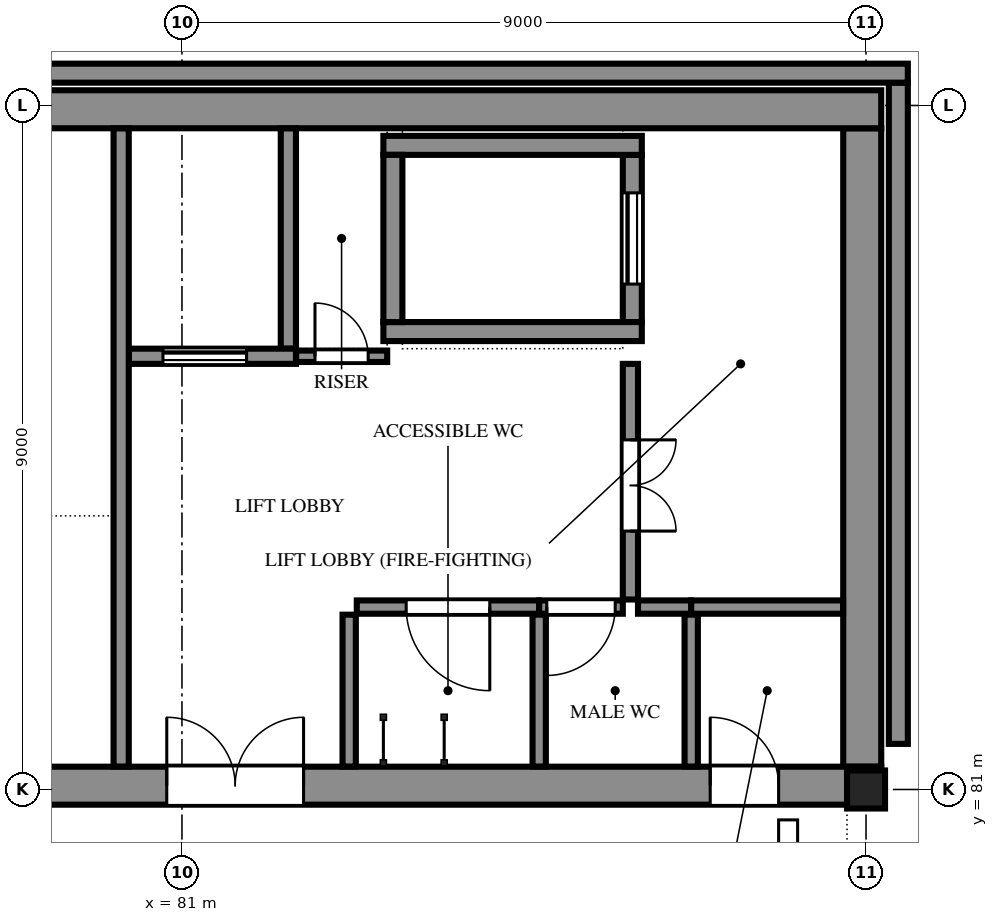
"""IFC4 building model, lengths in metres.
Left out: names, types, materials, properties, quantities, classifications, styles, units other than length and angle.
Written with IfcOpenShell. Run it as: python <this file> out.ifc"""

import sys

from ifc_helpers import new_model, si_unit, direction, frame, frame_2d, origin, origin_2d, place, context, subcontext, project, spatial, polyline, rectangle, hollow_rectangle, outline, extrude, element, fill, save


model = new_model("IFC4")
c1 = context("Model", 3, precision=1e-05, world=origin(), true_north=direction((0.0, 1.0)))
c2 = subcontext(c1, "Body", "Model", "MODEL_VIEW")
j1 = project(units=[si_unit("LENGTHUNIT", "METRE"), si_unit("PLANEANGLEUNIT", "RADIAN")], contexts=[c1])
p1 = place(None, origin())
s1 = spatial("IfcSite", under=j1, at=p1, CompositionType="ELEMENT")
p2 = place(p1, origin())
s2 = spatial("IfcBuilding", under=s1, at=p2, CompositionType="ELEMENT")
p3 = place(p2, frame((0.0, 0.0, 20.1)))
s3 = spatial("IfcBuildingStorey", under=s2, at=p3, CompositionType="ELEMENT", Elevation=20.1)
p4 = place(p3, frame((90.0, 81.0, 0.0), z_axis=(0.0, 0.0, 1.0), x_axis=(1.0, 0.0, 0.0)))
e1 = element("IfcColumn", 1, at=p4, inside=s3, PredefinedType="COLUMN", context=c2, shape_type="SweptSolid", body=[
    extrude(hollow_rectangle(XDim=0.5, YDim=0.5, WallThickness=0.032, at=origin_2d()), origin(), (0.0, 0.0, 1.0), 4.2),
])
p5 = place(p3, frame((71.8, 81.05, 0.0), z_axis=(0.0, 0.0, 1.0), x_axis=(1.0, 0.0, 0.0)))
e2 = element("IfcWall", 2, at=p5, inside=s3, PredefinedType="SOLIDWALL", context=c2, shape_type="SweptSolid", body=[
    extrude(rectangle(XDim=18.4, YDim=0.5, at=frame_2d((9.2, 0.0))), origin(), (0.0, 0.0, 1.0), 4.2),
])
p6 = place(p5, frame((1.5, 0.0, 0.0)))
e3 = element("IfcOpeningElement", 3, at=p6, cuts=e2, PredefinedType="OPENING", context=c2, shape_type="SweptSolid", body=[
    extrude(rectangle(XDim=1.8, YDim=2.1, at=frame_2d((0.9, 1.05))), frame((0.0, 0.26, 0.0), z_axis=(0.0, -1.0, 0.0), x_axis=(1.0, 0.0, 0.0)), (0.0, 0.0, 1.0), 0.52),
])
p7 = place(p5, frame((5.5, 0.0, 0.0)))
e4 = element("IfcOpeningElement", 4, at=p7, cuts=e2, PredefinedType="OPENING", context=c2, shape_type="SweptSolid", body=[
    extrude(rectangle(XDim=1.8, YDim=2.1, at=frame_2d((0.9, 1.05))), frame((0.0, 0.26, 0.0), z_axis=(0.0, -1.0, 0.0), x_axis=(1.0, 0.0, 0.0)), (0.0, 0.0, 1.0), 0.52),
])
p8 = place(p5, frame((9.0, 0.0, 0.0)))
e5 = element("IfcOpeningElement", 5, at=p8, cuts=e2, PredefinedType="OPENING", context=c2, shape_type="SweptSolid", body=[
    extrude(rectangle(XDim=1.8, YDim=2.1, at=frame_2d((0.9, 1.05))), frame((0.0, 0.26, 0.0), z_axis=(0.0, -1.0, 0.0), x_axis=(1.0, 0.0, 0.0)), (0.0, 0.0, 1.0), 0.52),
])
p9 = place(p5, frame((16.15, 0.0, 0.0)))
e6 = element("IfcOpeningElement", 6, at=p9, cuts=e2, PredefinedType="OPENING", context=c2, shape_type="SweptSolid", body=[
    extrude(rectangle(XDim=0.9, YDim=2.1, at=frame_2d((0.45, 1.05))), frame((0.0, 0.26, 0.0), z_axis=(0.0, -1.0, 0.0), x_axis=(1.0, 0.0, 0.0)), (0.0, 0.0, 1.0), 0.52),
])
p10 = place(p3, frame((71.8, 89.95, 0.0), z_axis=(0.0, 0.0, 1.0), x_axis=(1.0, 0.0, 0.0)))
e7 = element("IfcWall", 7, at=p10, inside=s3, PredefinedType="SOLIDWALL", context=c2, shape_type="SweptSolid", body=[
    extrude(rectangle(XDim=18.4, YDim=0.5, at=frame_2d((9.2, 0.0))), origin(), (0.0, 0.0, 1.0), 4.2),
])
p11 = place(p3, frame((89.95, 81.3, 0.0), z_axis=(0.0, 0.0, 1.0), x_axis=(0.0, 1.0, 0.0)))
e8 = element("IfcWall", 8, at=p11, inside=s3, PredefinedType="SOLIDWALL", context=c2, shape_type="SweptSolid", body=[
    extrude(rectangle(XDim=8.4, YDim=0.5, at=frame_2d((4.2, 0.0))), origin(), (0.0, 0.0, 1.0), 4.2),
])
p12 = place(p3, frame((80.2, 81.302, -0.15), z_axis=(0.0, 0.0, 1.0), x_axis=(0.0, 1.0, 0.0)))
e9 = element("IfcWall", 9, at=p12, inside=s3, PredefinedType="SOLIDWALL", context=c2, shape_type="SweptSolid", body=[
    extrude(rectangle(XDim=8.396, YDim=0.2, at=frame_2d((4.198, 0.0))), origin(), (0.0, 0.0, 1.0), 3.666),
])
p13 = place(p3, frame((80.302, 86.7, 0.0), z_axis=(0.0, 0.0, 1.0), x_axis=(1.0, 0.0, 0.0)))
e10 = element("IfcWall", 10, at=p13, inside=s3, PredefinedType="SOLIDWALL", context=c2, shape_type="SweptSolid", body=[
    extrude(rectangle(XDim=2.198, YDim=0.2, at=frame_2d((1.099, 0.0))), origin(), (0.0, 0.0, 1.0), 3.516),
])
p14 = place(p13, frame((0.448, 0.0, 0.0)))
e11 = element("IfcOpeningElement", 11, at=p14, cuts=e10, PredefinedType="OPENING", context=c2, shape_type="SweptSolid", body=[
    extrude(rectangle(XDim=1.1, YDim=2.1, at=frame_2d((0.55, 1.05))), frame((0.0, 0.11, 0.0), z_axis=(0.0, -1.0, 0.0), x_axis=(1.0, 0.0, 0.0)), (0.0, 0.0, 1.0), 0.22),
])
p15 = place(p3, frame((82.4, 86.8, 0.0), z_axis=(0.0, 0.0, 1.0), x_axis=(0.0, 1.0, 0.0)))
e12 = element("IfcWall", 12, at=p15, inside=s3, PredefinedType="SOLIDWALL", context=c2, shape_type="SweptSolid", body=[
    extrude(rectangle(XDim=2.898, YDim=0.2, at=frame_2d((1.449, 0.0))), origin(), (0.0, 0.0, 1.0), 3.516),
])
for number, where, z_axis, x_axis in (
    (13, (83.65, 87.025, 0.0), (0.0, 0.0, 1.0), (1.0, 0.0, 0.0)),
    (14, (83.65, 89.475, 0.0), (0.0, 0.0, 1.0), (1.0, 0.0, 0.0)),
):
    element("IfcWall", number, at=place(p3, frame(where, z_axis=z_axis, x_axis=x_axis)), inside=s3, PredefinedType="SOLIDWALL", context=c2, shape_type="SweptSolid", body=[
        extrude(rectangle(XDim=3.4, YDim=0.25, at=frame_2d((1.7, 0.0))), origin(), (0.0, 0.0, 1.0), 3.516),
    ])
p16 = place(p3, frame((83.775, 87.15, 0.0), z_axis=(0.0, 0.0, 1.0), x_axis=(0.0, 1.0, 0.0)))
e15 = element("IfcWall", 15, at=p16, inside=s3, PredefinedType="SOLIDWALL", context=c2, shape_type="SweptSolid", body=[
    extrude(rectangle(XDim=2.2, YDim=0.25, at=frame_2d((1.1, 0.0))), origin(), (0.0, 0.0, 1.0), 3.516),
])
p17 = place(p3, frame((86.925, 87.15, 0.0), z_axis=(0.0, 0.0, 1.0), x_axis=(0.0, 1.0, 0.0)))
e16 = element("IfcWall", 16, at=p17, inside=s3, PredefinedType="SOLIDWALL", context=c2, shape_type="SweptSolid", body=[
    extrude(rectangle(XDim=2.2, YDim=0.25, at=frame_2d((1.1, 0.0))), origin(), (0.0, 0.0, 1.0), 3.516),
])
p18 = place(p17, frame((0.5, 0.0, 0.0)))
e17 = element("IfcOpeningElement", 17, at=p18, cuts=e16, PredefinedType="OPENING", context=c2, shape_type="SweptSolid", body=[
    extrude(rectangle(XDim=1.2, YDim=2.1, at=frame_2d((0.6, 1.05))), frame((0.0, 0.135, 0.0), z_axis=(0.0, -1.0, 0.0), x_axis=(1.0, 0.0, 0.0)), (0.0, 0.0, 1.0), 0.27),
])
p19 = place(p3, frame((85.7, 83.4, 0.0), z_axis=(0.0, 0.0, 1.0), x_axis=(-1.0, 0.0, 0.0)))
e18 = element("IfcWall", 18, at=p19, inside=s3, PredefinedType="PARTITIONING", context=c2, shape_type="SweptSolid", body=[
    extrude(rectangle(XDim=2.4, YDim=0.175, at=frame_2d((1.2, 0.0))), origin(), (0.0, 0.0, 1.0), 3.307),
])
p20 = place(p19, frame((0.65, 0.0, 0.0)))
e19 = element("IfcOpeningElement", 19, at=p20, cuts=e18, PredefinedType="OPENING", context=c2, shape_type="SweptSolid", body=[
    extrude(rectangle(XDim=1.1, YDim=2.1, at=frame_2d((0.55, 1.05))), frame((0.0, 0.097, 0.0), z_axis=(0.0, -1.0, 0.0), x_axis=(1.0, 0.0, 0.0)), (0.0, 0.0, 1.0), 0.195),
])
p21 = place(p3, frame((83.2, 83.3, 0.0), z_axis=(0.0, 0.0, 1.0), x_axis=(0.0, -1.0, 0.0)))
e20 = element("IfcWall", 20, at=p21, inside=s3, PredefinedType="PARTITIONING", context=c2, shape_type="SweptSolid", body=[
    extrude(rectangle(XDim=1.998, YDim=0.175, at=frame_2d((0.999, 0.0))), origin(), (0.0, 0.0, 1.0), 3.307),
])
p22 = place(p3, frame((86.8, 83.4, 0.0), z_axis=(0.0, 0.0, 1.0), x_axis=(-1.0, 0.0, 0.0)))
e21 = element("IfcWall", 21, at=p22, inside=s3, PredefinedType="PARTITIONING", context=c2, shape_type="SweptSolid", body=[
    extrude(rectangle(XDim=1.1, YDim=0.175, at=frame_2d((0.55, 0.0))), origin(), (0.0, 0.0, 1.0), 3.307),
])
p23 = place(p22, frame((0.1, 0.0, 0.0)))
e22 = element("IfcOpeningElement", 22, at=p23, cuts=e21, PredefinedType="OPENING", context=c2, shape_type="SweptSolid", body=[
    extrude(rectangle(XDim=0.9, YDim=2.1, at=frame_2d((0.45, 1.05))), frame((0.0, 0.097, 0.0), z_axis=(0.0, -1.0, 0.0), x_axis=(1.0, 0.0, 0.0)), (0.0, 0.0, 1.0), 0.195),
])
p24 = place(p3, frame((86.9, 86.6, 0.0), z_axis=(0.0, 0.0, 1.0), x_axis=(0.0, -1.0, 0.0)))
e23 = element("IfcWall", 23, at=p24, inside=s3, PredefinedType="PARTITIONING", context=c2, shape_type="SweptSolid", body=[
    extrude(rectangle(XDim=3.1, YDim=0.2, at=frame_2d((1.55, 0.0))), origin(), (0.0, 0.0, 1.0), 3.382),
])
p25 = place(p24, frame((1.0, 0.0, 0.0)))
e24 = element("IfcOpeningElement", 24, at=p25, cuts=e23, PredefinedType="OPENING", context=c2, shape_type="SweptSolid", body=[
    extrude(rectangle(XDim=1.2, YDim=2.1, at=frame_2d((0.6, 1.05))), frame((0.0, 0.11, 0.0), z_axis=(0.0, -1.0, 0.0), x_axis=(1.0, 0.0, 0.0)), (0.0, 0.0, 1.0), 0.22),
])
p26 = place(p3, frame((82.502, 86.7, 0.0), z_axis=(0.0, 0.0, 1.0), x_axis=(1.0, 0.0, 0.0)))
e25 = element("IfcWall", 25, at=p26, inside=s3, PredefinedType="SOLIDWALL", context=c2, shape_type="SweptSolid", body=[
    extrude(rectangle(XDim=1.198, YDim=0.15, at=frame_2d((0.599, 0.0))), origin(), (0.0, 0.0, 1.0), 3.516),
])
p27 = place(p26, frame((0.248, 0.0, 0.0)))
e26 = element("IfcOpeningElement", 26, at=p27, cuts=e25, PredefinedType="OPENING", context=c2, shape_type="SweptSolid", body=[
    extrude(rectangle(XDim=0.7, YDim=2.0, at=frame_2d((0.35, 1.0))), frame((0.0, 0.085, 0.0), z_axis=(0.0, -1.0, 0.0), x_axis=(1.0, 0.0, 0.0)), (0.0, 0.0, 1.0), 0.17),
])
p28 = place(p3, frame((87.7, 83.4, 0.0), z_axis=(0.0, 0.0, 1.0), x_axis=(-1.0, 0.0, 0.0)))
e27 = element("IfcWall", 27, at=p28, inside=s3, PredefinedType="PARTITIONING", context=c2, shape_type="SweptSolid", body=[
    extrude(rectangle(XDim=0.7, YDim=0.175, at=frame_2d((0.35, 0.0))), origin(), (0.0, 0.0, 1.0), 3.307),
])
for number, where, z_axis, x_axis in (
    (28, (89.698, 83.4, 0.0), (0.0, 0.0, 1.0), (-1.0, 0.0, 0.0)),
    (29, (85.7, 83.3, 0.0), (0.0, 0.0, 1.0), (0.0, -1.0, 0.0)),
    (30, (87.7, 83.3, 0.0), (0.0, 0.0, 1.0), (0.0, -1.0, 0.0)),
):
    element("IfcWall", number, at=place(p3, frame(where, z_axis=z_axis, x_axis=x_axis)), inside=s3, PredefinedType="PARTITIONING", context=c2, shape_type="SweptSolid", body=[
        extrude(rectangle(XDim=1.998, YDim=0.175, at=frame_2d((0.999, 0.0))), origin(), (0.0, 0.0, 1.0), 3.307),
    ])
p29 = place(p14, origin())
e31 = element("IfcDoor", 31, at=p29, inside=s3, OperationType="SLIDING_TO_LEFT", PredefinedType="DOOR", context=c2, shape_type="SweptSolid", body=[
    extrude(outline(polyline([(0.0, 0.0), (0.07, 0.0), (0.07, 2.03), (1.03, 2.03), (1.03, 0.0), (1.1, 0.0), (1.1, 2.1), (0.0, 2.1), (0.0, 0.0)])), frame((0.0, 0.025, 0.0), z_axis=(0.0, -1.0, 0.0), x_axis=(1.0, 0.0, 0.0)), (0.0, 0.0, 1.0), 0.05),
    extrude(rectangle(XDim=0.524, YDim=2.016, at=frame_2d((0.336, 1.018))), frame((0.0, 0.018, 0.0), z_axis=(0.0, -1.0, 0.0), x_axis=(1.0, 0.0, 0.0)), (0.0, 0.0, 1.0), 0.016),
    extrude(rectangle(XDim=0.52, YDim=2.016, at=frame_2d((0.766, 1.018))), frame((0.0, -0.002, 0.0), z_axis=(0.0, -1.0, 0.0), x_axis=(1.0, 0.0, 0.0)), (0.0, 0.0, 1.0), 0.016),
])
fill(e11, e31)
p30 = place(p18, origin())
e32 = element("IfcDoor", 32, at=p30, inside=s3, OperationType="SLIDING_TO_LEFT", PredefinedType="DOOR", context=c2, shape_type="SweptSolid", body=[
    extrude(outline(polyline([(0.0, 0.0), (0.07, 0.0), (0.07, 2.03), (1.13, 2.03), (1.13, 0.0), (1.2, 0.0), (1.2, 2.1), (0.0, 2.1), (0.0, 0.0)])), frame((0.0, 0.025, 0.0), z_axis=(0.0, -1.0, 0.0), x_axis=(1.0, 0.0, 0.0)), (0.0, 0.0, 1.0), 0.05),
    extrude(rectangle(XDim=0.579, YDim=2.016, at=frame_2d((0.363, 1.018))), frame((0.0, 0.018, 0.0), z_axis=(0.0, -1.0, 0.0), x_axis=(1.0, 0.0, 0.0)), (0.0, 0.0, 1.0), 0.016),
    extrude(rectangle(XDim=0.575, YDim=2.016, at=frame_2d((0.839, 1.018))), frame((0.0, -0.002, 0.0), z_axis=(0.0, -1.0, 0.0), x_axis=(1.0, 0.0, 0.0)), (0.0, 0.0, 1.0), 0.016),
])
fill(e17, e32)
p31 = place(p8, origin())
e33 = element("IfcDoor", 33, at=p31, inside=s3, OperationType="DOUBLE_DOOR_SINGLE_SWING", PredefinedType="DOOR", context=c2, shape_type="SweptSolid", body=[
    extrude(outline(polyline([(0.0, 0.0), (0.07, 0.0), (0.07, 2.03), (1.73, 2.03), (1.73, 0.0), (1.8, 0.0), (1.8, 2.1), (0.0, 2.1), (0.0, 0.0)])), frame((0.0, 0.025, 0.0), z_axis=(0.0, -1.0, 0.0), x_axis=(1.0, 0.0, 0.0)), (0.0, 0.0, 1.0), 0.05),
    extrude(outline(polyline([(0.074, 0.01), (0.897, 0.01), (0.897, 2.026), (0.074, 2.026), (0.074, 0.01)]), holes=[polyline([(0.194, 0.16), (0.777, 0.16), (0.777, 1.01), (0.194, 1.01), (0.194, 0.16)]), polyline([(0.335, 1.16), (0.635, 1.16), (0.635, 1.76), (0.335, 1.76), (0.335, 1.16)])]), frame((0.0, 0.017, 0.0), z_axis=(0.0, -1.0, 0.0), x_axis=(1.0, 0.0, 0.0)), (0.0, 0.0, 1.0), 0.035),
    extrude(rectangle(XDim=0.583, YDim=0.85, at=frame_2d((0.485, 0.585))), frame((0.0, 0.009, 0.0), z_axis=(0.0, -1.0, 0.0), x_axis=(1.0, 0.0, 0.0)), (0.0, 0.0, 1.0), 0.017),
    extrude(rectangle(XDim=0.3, YDim=0.6, at=frame_2d((0.485, 1.46))), frame((0.0, 0.006, 0.0), z_axis=(0.0, -1.0, 0.0), x_axis=(1.0, 0.0, 0.0)), (0.0, 0.0, 1.0), 0.012),
    extrude(outline(polyline([(0.903, 0.01), (1.726, 0.01), (1.726, 2.026), (0.903, 2.026), (0.903, 0.01)]), holes=[polyline([(1.023, 0.16), (1.606, 0.16), (1.606, 1.01), (1.023, 1.01), (1.023, 0.16)]), polyline([(1.165, 1.16), (1.465, 1.16), (1.465, 1.76), (1.165, 1.76), (1.165, 1.16)])]), frame((0.0, 0.017, 0.0), z_axis=(0.0, -1.0, 0.0), x_axis=(1.0, 0.0, 0.0)), (0.0, 0.0, 1.0), 0.035),
    extrude(rectangle(XDim=0.583, YDim=0.85, at=frame_2d((1.314, 0.585))), frame((0.0, 0.009, 0.0), z_axis=(0.0, -1.0, 0.0), x_axis=(1.0, 0.0, 0.0)), (0.0, 0.0, 1.0), 0.017),
    extrude(rectangle(XDim=0.3, YDim=0.6, at=frame_2d((1.314, 1.46))), frame((0.0, 0.006, 0.0), z_axis=(0.0, -1.0, 0.0), x_axis=(1.0, 0.0, 0.0)), (0.0, 0.0, 1.0), 0.012),
])
fill(e5, e33)
p32 = place(p25, origin())
e34 = element("IfcDoor", 34, at=p32, inside=s3, OperationType="DOUBLE_DOOR_SINGLE_SWING", PredefinedType="DOOR", context=c2, shape_type="SweptSolid", body=[
    extrude(outline(polyline([(0.0, 0.0), (0.07, 0.0), (0.07, 2.03), (1.13, 2.03), (1.13, 0.0), (1.2, 0.0), (1.2, 2.1), (0.0, 2.1), (0.0, 0.0)])), frame((0.0, 0.025, 0.0), z_axis=(0.0, -1.0, 0.0), x_axis=(1.0, 0.0, 0.0)), (0.0, 0.0, 1.0), 0.05),
    extrude(outline(polyline([(0.074, 0.01), (0.597, 0.01), (0.597, 2.026), (0.074, 2.026), (0.074, 0.01)]), holes=[polyline([(0.178, 0.373), (0.492, 0.373), (0.492, 1.784), (0.178, 1.784), (0.178, 0.373)])]), frame((0.0, 0.017, 0.0), z_axis=(0.0, -1.0, 0.0), x_axis=(1.0, 0.0, 0.0)), (0.0, 0.0, 1.0), 0.035),
    extrude(rectangle(XDim=0.314, YDim=1.411, at=frame_2d((0.335, 1.079))), frame((0.0, 0.009, 0.0), z_axis=(0.0, -1.0, 0.0), x_axis=(1.0, 0.0, 0.0)), (0.0, 0.0, 1.0), 0.017),
    extrude(outline(polyline([(0.603, 0.01), (1.126, 0.01), (1.126, 2.026), (0.603, 2.026), (0.603, 0.01)]), holes=[polyline([(0.708, 0.373), (1.021, 0.373), (1.021, 1.784), (0.708, 1.784), (0.708, 0.373)])]), frame((0.0, 0.017, 0.0), z_axis=(0.0, -1.0, 0.0), x_axis=(1.0, 0.0, 0.0)), (0.0, 0.0, 1.0), 0.035),
    extrude(rectangle(XDim=0.314, YDim=1.411, at=frame_2d((0.865, 1.079))), frame((0.0, 0.009, 0.0), z_axis=(0.0, -1.0, 0.0), x_axis=(1.0, 0.0, 0.0)), (0.0, 0.0, 1.0), 0.017),
])
fill(e24, e34)
p33 = place(p27, origin())
e35 = element("IfcDoor", 35, at=p33, inside=s3, OperationType="SINGLE_SWING_LEFT", PredefinedType="DOOR", context=c2, shape_type="SweptSolid", body=[
    extrude(outline(polyline([(0.0, 0.0), (0.07, 0.0), (0.07, 1.93), (0.63, 1.93), (0.63, 0.0), (0.7, 0.0), (0.7, 2.0), (0.0, 2.0), (0.0, 0.0)])), frame((0.0, 0.025, 0.0), z_axis=(0.0, -1.0, 0.0), x_axis=(1.0, 0.0, 0.0)), (0.0, 0.0, 1.0), 0.05),
    extrude(outline(polyline([(0.074, 0.01), (0.626, 0.01), (0.626, 1.926), (0.074, 1.926), (0.074, 0.01)]), holes=[polyline([(0.184, 0.16), (0.516, 0.16), (0.516, 1.01), (0.184, 1.01), (0.184, 0.16)]), polyline([(0.2, 1.16), (0.5, 1.16), (0.5, 1.76), (0.2, 1.76), (0.2, 1.16)])]), frame((0.0, 0.017, 0.0), z_axis=(0.0, -1.0, 0.0), x_axis=(1.0, 0.0, 0.0)), (0.0, 0.0, 1.0), 0.035),
    extrude(rectangle(XDim=0.331, YDim=0.85, at=frame_2d((0.35, 0.585))), frame((0.0, 0.009, 0.0), z_axis=(0.0, -1.0, 0.0), x_axis=(1.0, 0.0, 0.0)), (0.0, 0.0, 1.0), 0.017),
    extrude(rectangle(XDim=0.3, YDim=0.6, at=frame_2d((0.35, 1.46))), frame((0.0, 0.006, 0.0), z_axis=(0.0, -1.0, 0.0), x_axis=(1.0, 0.0, 0.0)), (0.0, 0.0, 1.0), 0.012),
])
fill(e26, e35)
p34 = place(p20, origin())
e36 = element("IfcDoor", 36, at=p34, inside=s3, OperationType="SINGLE_SWING_LEFT", PredefinedType="DOOR", context=c2, shape_type="SweptSolid", body=[
    extrude(outline(polyline([(0.0, 0.0), (0.07, 0.0), (0.07, 2.03), (1.03, 2.03), (1.03, 0.0), (1.1, 0.0), (1.1, 2.1), (0.0, 2.1), (0.0, 0.0)])), frame((0.0, 0.025, 0.0), z_axis=(0.0, -1.0, 0.0), x_axis=(1.0, 0.0, 0.0)), (0.0, 0.0, 1.0), 0.05),
    extrude(outline(polyline([(0.074, 0.01), (1.026, 0.01), (1.026, 2.026), (0.074, 2.026), (0.074, 0.01)]), holes=[polyline([(0.194, 0.16), (0.906, 0.16), (0.906, 1.01), (0.194, 1.01), (0.194, 0.16)]), polyline([(0.4, 1.16), (0.7, 1.16), (0.7, 1.76), (0.4, 1.76), (0.4, 1.16)])]), frame((0.0, 0.017, 0.0), z_axis=(0.0, -1.0, 0.0), x_axis=(1.0, 0.0, 0.0)), (0.0, 0.0, 1.0), 0.035),
    extrude(rectangle(XDim=0.712, YDim=0.85, at=frame_2d((0.55, 0.585))), frame((0.0, 0.009, 0.0), z_axis=(0.0, -1.0, 0.0), x_axis=(1.0, 0.0, 0.0)), (0.0, 0.0, 1.0), 0.017),
    extrude(rectangle(XDim=0.3, YDim=0.6, at=frame_2d((0.55, 1.46))), frame((0.0, 0.006, 0.0), z_axis=(0.0, -1.0, 0.0), x_axis=(1.0, 0.0, 0.0)), (0.0, 0.0, 1.0), 0.012),
])
fill(e19, e36)
p35 = place(p23, origin())
e37 = element("IfcDoor", 37, at=p35, inside=s3, OperationType="SINGLE_SWING_RIGHT", PredefinedType="DOOR", context=c2, shape_type="SweptSolid", body=[
    extrude(outline(polyline([(0.0, 0.0), (0.07, 0.0), (0.07, 2.03), (0.83, 2.03), (0.83, 0.0), (0.9, 0.0), (0.9, 2.1), (0.0, 2.1), (0.0, 0.0)])), frame((0.0, 0.025, 0.0), z_axis=(0.0, -1.0, 0.0), x_axis=(1.0, 0.0, 0.0)), (0.0, 0.0, 1.0), 0.05),
    extrude(outline(polyline([(0.074, 0.01), (0.826, 0.01), (0.826, 2.026), (0.074, 2.026), (0.074, 0.01)]), holes=[polyline([(0.194, 0.16), (0.706, 0.16), (0.706, 1.01), (0.194, 1.01), (0.194, 0.16)]), polyline([(0.3, 1.16), (0.6, 1.16), (0.6, 1.76), (0.3, 1.76), (0.3, 1.16)])]), frame((0.0, 0.017, 0.0), z_axis=(0.0, -1.0, 0.0), x_axis=(1.0, 0.0, 0.0)), (0.0, 0.0, 1.0), 0.035),
    extrude(rectangle(XDim=0.512, YDim=0.85, at=frame_2d((0.45, 0.585))), frame((0.0, 0.009, 0.0), z_axis=(0.0, -1.0, 0.0), x_axis=(1.0, 0.0, 0.0)), (0.0, 0.0, 1.0), 0.017),
    extrude(rectangle(XDim=0.3, YDim=0.6, at=frame_2d((0.45, 1.46))), frame((0.0, 0.006, 0.0), z_axis=(0.0, -1.0, 0.0), x_axis=(1.0, 0.0, 0.0)), (0.0, 0.0, 1.0), 0.012),
])
fill(e22, e37)
p36 = place(p9, origin())
e38 = element("IfcDoor", 38, at=p36, inside=s3, OperationType="SINGLE_SWING_LEFT", PredefinedType="DOOR", context=c2, shape_type="SweptSolid", body=[
    extrude(outline(polyline([(0.0, 0.0), (0.07, 0.0), (0.07, 2.03), (0.83, 2.03), (0.83, 0.0), (0.9, 0.0), (0.9, 2.1), (0.0, 2.1), (0.0, 0.0)])), frame((0.0, 0.025, 0.0), z_axis=(0.0, -1.0, 0.0), x_axis=(1.0, 0.0, 0.0)), (0.0, 0.0, 1.0), 0.05),
    extrude(outline(polyline([(0.074, 0.01), (0.826, 0.01), (0.826, 2.026), (0.074, 2.026), (0.074, 0.01)]), holes=[polyline([(0.194, 0.16), (0.706, 0.16), (0.706, 1.01), (0.194, 1.01), (0.194, 0.16)]), polyline([(0.3, 1.16), (0.6, 1.16), (0.6, 1.76), (0.3, 1.76), (0.3, 1.16)])]), frame((0.0, 0.017, 0.0), z_axis=(0.0, -1.0, 0.0), x_axis=(1.0, 0.0, 0.0)), (0.0, 0.0, 1.0), 0.035),
    extrude(rectangle(XDim=0.512, YDim=0.85, at=frame_2d((0.45, 0.585))), frame((0.0, 0.009, 0.0), z_axis=(0.0, -1.0, 0.0), x_axis=(1.0, 0.0, 0.0)), (0.0, 0.0, 1.0), 0.017),
    extrude(rectangle(XDim=0.3, YDim=0.6, at=frame_2d((0.45, 1.46))), frame((0.0, 0.006, 0.0), z_axis=(0.0, -1.0, 0.0), x_axis=(1.0, 0.0, 0.0)), (0.0, 0.0, 1.0), 0.012),
])
fill(e6, e38)
save(model, sys.argv[1])
